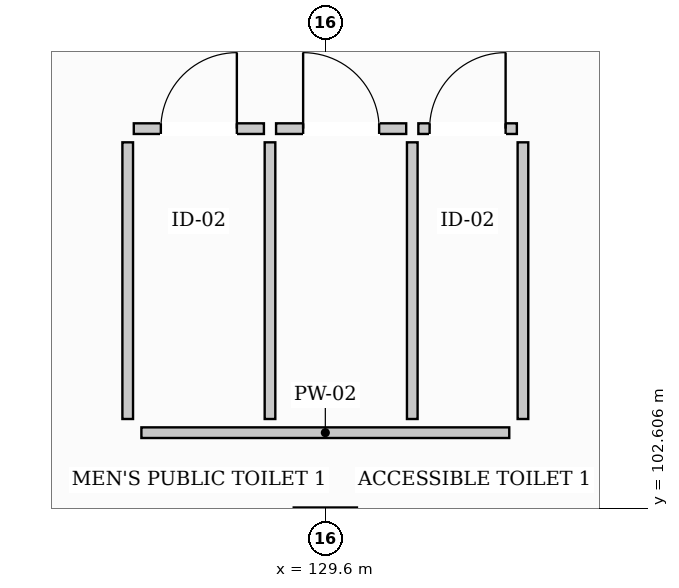
"""IFC4 building model, lengths in metres.
Left out: names, types, materials, properties, quantities, classifications, styles, units other than length and angle.
Written with IfcOpenShell. Run it as: python <this file> out.ifc"""

import sys

from ifc_helpers import new_model, si_unit, direction, frame, frame_2d, origin, place, context, subcontext, project, spatial, rectangle, extrude, element, fill, save


model = new_model("IFC4")
c1 = context("Model", 3, precision=1e-05, world=origin(), true_north=direction((0.0, 1.0)))
c2 = subcontext(c1, "Body", "Model", "MODEL_VIEW")
j1 = project(units=[si_unit("LENGTHUNIT", "METRE"), si_unit("PLANEANGLEUNIT", "RADIAN")], contexts=[c1])
p1 = place(None, origin())
s1 = spatial("IfcSite", under=j1, at=p1, CompositionType="ELEMENT")
p2 = place(p1, origin())
s2 = spatial("IfcBuilding", under=s1, at=p2, CompositionType="ELEMENT")
p3 = place(p2, frame((0.0, 0.0, 9.6)))
s3 = spatial("IfcBuildingStorey", under=s2, at=p3, CompositionType="ELEMENT", Elevation=9.6)
p4 = place(p3, frame((127.18, 103.6, 0.0), z_axis=(0.0, 0.0, 1.0), x_axis=(1.0, 0.0, 0.0)))
e1 = element("IfcWall", 1, at=p4, inside=s3, PredefinedType="PARTITIONING", context=c2, shape_type="SweptSolid", body=[
    extrude(rectangle(XDim=4.84, YDim=0.14, at=frame_2d((2.42, 0.0))), origin(), (0.0, 0.0, 1.0), 2.42),
])
for number, where, z_axis, x_axis in (
    (2, (127.0, 103.78, 0.0), (0.0, 0.0, 1.0), (0.0, 1.0, 0.0)),
    (3, (132.2, 103.78, 0.0), (0.0, 0.0, 1.0), (0.0, 1.0, 0.0)),
    (4, (128.872, 103.78, 0.0), (0.0, 0.0, 1.0), (0.0, 1.0, 0.0)),
    (5, (130.744, 103.78, 0.0), (0.0, 0.0, 1.0), (0.0, 1.0, 0.0)),
):
    element("IfcWall", number, at=place(p3, frame(where, z_axis=z_axis, x_axis=x_axis)), inside=s3, PredefinedType="PARTITIONING", context=c2, shape_type="SweptSolid", body=[
        extrude(rectangle(XDim=3.64, YDim=0.14, at=frame_2d((1.82, 0.0))), origin(), (0.0, 0.0, 1.0), 3.32),
    ])
p5 = place(p3, frame((127.08, 107.6, 0.0), z_axis=(0.0, 0.0, 1.0), x_axis=(1.0, 0.0, 0.0)))
e6 = element("IfcWall", 6, at=p5, inside=s3, PredefinedType="PARTITIONING", context=c2, shape_type="SweptSolid", body=[
    extrude(rectangle(XDim=1.712, YDim=0.14, at=frame_2d((0.856, 0.0))), origin(), (0.0, 0.0, 1.0), 3.32),
])
p6 = place(p5, frame((0.356, 0.0, 0.0)))
e7 = element("IfcOpeningElement", 7, at=p6, cuts=e6, PredefinedType="OPENING", context=c2, shape_type="SweptSolid", body=[
    extrude(rectangle(XDim=1.0, YDim=2.15, at=frame_2d((0.5, 1.075))), frame((0.0, 0.08, 0.0), z_axis=(0.0, -1.0, 0.0), x_axis=(1.0, 0.0, 0.0)), (0.0, 0.0, 1.0), 0.16),
])
p7 = place(p3, frame((128.952, 107.6, 0.0), z_axis=(0.0, 0.0, 1.0), x_axis=(1.0, 0.0, 0.0)))
e8 = element("IfcWall", 8, at=p7, inside=s3, PredefinedType="PARTITIONING", context=c2, shape_type="SweptSolid", body=[
    extrude(rectangle(XDim=1.712, YDim=0.14, at=frame_2d((0.856, 0.0))), origin(), (0.0, 0.0, 1.0), 2.42),
])
p8 = place(p7, frame((0.356, 0.0, 0.0)))
e9 = element("IfcOpeningElement", 9, at=p8, cuts=e8, PredefinedType="OPENING", context=c2, shape_type="SweptSolid", body=[
    extrude(rectangle(XDim=1.0, YDim=2.15, at=frame_2d((0.5, 1.075))), frame((0.0, 0.08, 0.0), z_axis=(0.0, -1.0, 0.0), x_axis=(1.0, 0.0, 0.0)), (0.0, 0.0, 1.0), 0.16),
])
p9 = place(p3, frame((130.824, 107.6, 0.0), z_axis=(0.0, 0.0, 1.0), x_axis=(1.0, 0.0, 0.0)))
e10 = element("IfcWall", 10, at=p9, inside=s3, PredefinedType="PARTITIONING", context=c2, shape_type="SweptSolid", body=[
    extrude(rectangle(XDim=1.296, YDim=0.14, at=frame_2d((0.648, 0.0))), origin(), (0.0, 0.0, 1.0), 3.32),
])
p10 = place(p9, frame((0.148, 0.0, 0.0)))
e11 = element("IfcOpeningElement", 11, at=p10, cuts=e10, PredefinedType="OPENING", context=c2, shape_type="SweptSolid", body=[
    extrude(rectangle(XDim=1.0, YDim=2.15, at=frame_2d((0.5, 1.075))), frame((0.0, 0.08, 0.0), z_axis=(0.0, -1.0, 0.0), x_axis=(1.0, 0.0, 0.0)), (0.0, 0.0, 1.0), 0.16),
])
p11 = place(p6, origin())
e12 = element("IfcDoor", 12, at=p11, inside=s3, OperationType="SINGLE_SWING_RIGHT", PredefinedType="DOOR", context=c2, shape_type="SweptSolid", body=[
    extrude(rectangle(XDim=1.0, YDim=2.15, at=frame_2d((0.5, 1.075))), frame((0.0, 0.025, 0.0), z_axis=(0.0, -1.0, 0.0), x_axis=(1.0, 0.0, 0.0)), (0.0, 0.0, 1.0), 0.05),
])
fill(e7, e12)
p12 = place(p8, origin())
e13 = element("IfcDoor", 13, at=p12, inside=s3, OperationType="SINGLE_SWING_LEFT", PredefinedType="DOOR", context=c2, shape_type="SweptSolid", body=[
    extrude(rectangle(XDim=1.0, YDim=2.15, at=frame_2d((0.5, 1.075))), frame((0.0, 0.025, 0.0), z_axis=(0.0, -1.0, 0.0), x_axis=(1.0, 0.0, 0.0)), (0.0, 0.0, 1.0), 0.05),
])
fill(e9, e13)
p13 = place(p10, origin())
e14 = element("IfcDoor", 14, at=p13, inside=s3, OperationType="SINGLE_SWING_RIGHT", PredefinedType="DOOR", context=c2, shape_type="SweptSolid", body=[
    extrude(rectangle(XDim=1.0, YDim=2.15, at=frame_2d((0.5, 1.075))), frame((0.0, 0.025, 0.0), z_axis=(0.0, -1.0, 0.0), x_axis=(1.0, 0.0, 0.0)), (0.0, 0.0, 1.0), 0.05),
])
fill(e11, e14)
save(model, sys.argv[1])
